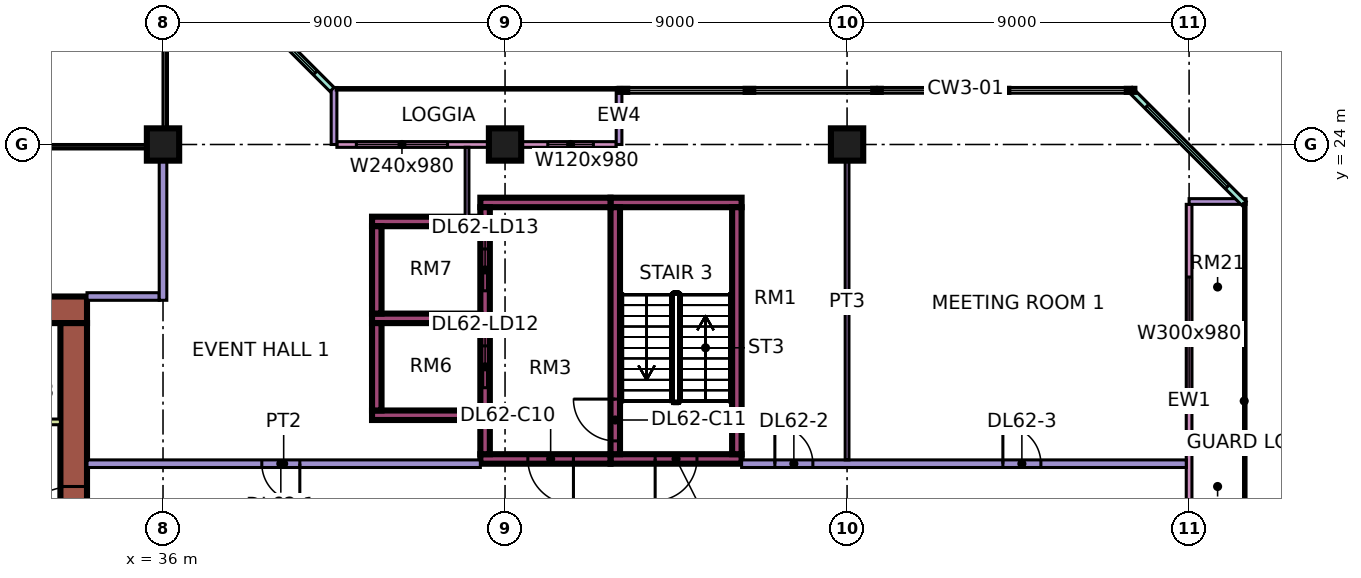
"""IFC4 building model, lengths in metres.
Left out: names, types, materials, properties, quantities, classifications, styles, units other than length and angle.
Written with IfcOpenShell. Run it as: python <this file> out.ifc"""

import sys

from ifc_helpers import new_model, si_unit, direction, frame, frame_2d, origin, origin_2d, place, context, subcontext, project, spatial, rectangle, extrude, element, fill, save


model = new_model("IFC4")
c1 = context("Model", 3, precision=1e-05, world=origin(), true_north=direction((0.0, 1.0)))
c2 = subcontext(c1, "Body", "Model", "MODEL_VIEW")
j1 = project(units=[si_unit("LENGTHUNIT", "METRE"), si_unit("PLANEANGLEUNIT", "RADIAN")], contexts=[c1])
p1 = place(None, origin())
s1 = spatial("IfcSite", under=j1, at=p1, CompositionType="ELEMENT")
p2 = place(p1, origin())
s2 = spatial("IfcBuilding", under=s1, at=p2, CompositionType="ELEMENT")
p3 = place(p2, frame((0.0, 0.0, 262.15)))
s3 = spatial("IfcBuildingStorey", under=s2, at=p3, CompositionType="ELEMENT", Elevation=262.15)
for number, where, z_axis, x_axis in (
    (1, (36.0, 24.0, 0.0), (0.0, 0.0, 1.0), (1.0, 0.0, 0.0)),
    (2, (45.0, 24.0, 0.0), (0.0, 0.0, 1.0), (1.0, 0.0, 0.0)),
    (3, (54.0, 24.0, 0.0), (0.0, 0.0, 1.0), (1.0, 0.0, 0.0)),
):
    element("IfcColumn", number, at=place(p3, frame(where, z_axis=z_axis, x_axis=x_axis)), inside=s3, PredefinedType="COLUMN", context=c2, shape_type="SweptSolid", body=[
        extrude(rectangle(XDim=0.85, YDim=0.85, at=origin_2d()), origin(), (0.0, 0.0, 1.0), 11.25),
    ])
p4 = place(p3, frame((9.0, 19.65, 0.0), z_axis=(0.0, 0.0, 1.0), x_axis=(1.0, 0.0, 0.0)))
e4 = element("IfcWall", 4, at=p4, inside=s3, PredefinedType="SHEAR", context=c2, shape_type="SweptSolid", body=[
    extrude(rectangle(XDim=25.0, YDim=0.7, at=frame_2d((12.5, 0.0))), origin(), (0.0, 0.0, 1.0), 11.25),
])
p5 = place(p4, frame((19.1, 0.0, 0.0)))
e5 = element("IfcOpeningElement", 5, at=p5, cuts=e4, PredefinedType="OPENING", context=c2, shape_type="SweptSolid", body=[
    extrude(rectangle(XDim=1.8, YDim=2.4, at=frame_2d((0.9, 1.2))), frame((0.0, 0.36, 0.0), z_axis=(0.0, -1.0, 0.0), x_axis=(1.0, 0.0, 0.0)), (0.0, 0.0, 1.0), 0.72),
])
p6 = place(p3, frame((33.65, 7.7, 0.0), z_axis=(0.0, 0.0, 1.0), x_axis=(0.0, 1.0, 0.0)))
e6 = element("IfcWall", 6, at=p6, inside=s3, PredefinedType="SHEAR", context=c2, shape_type="SweptSolid", body=[
    extrude(rectangle(XDim=11.6, YDim=0.7, at=frame_2d((5.8, 0.0))), origin(), (0.0, 0.0, 1.0), 11.25),
])
p7 = place(p6, frame((5.5, 0.0, 0.0)))
e7 = element("IfcOpeningElement", 7, at=p7, cuts=e6, PredefinedType="OPENING", context=c2, shape_type="SweptSolid", body=[
    extrude(rectangle(XDim=1.8, YDim=2.4, at=frame_2d((0.9, 1.2))), frame((0.0, 0.36, 0.0), z_axis=(0.0, -1.0, 0.0), x_axis=(1.0, 0.0, 0.0)), (0.0, 0.0, 1.0), 0.72),
])
p8 = place(p3, frame((47.775, 15.725, 0.0), z_axis=(0.0, 0.0, 1.0), x_axis=(1.0, 0.0, 0.0)))
e8 = element("IfcWall", 8, at=p8, inside=s3, PredefinedType="SHEAR", context=c2, shape_type="SweptSolid", body=[
    extrude(rectangle(XDim=3.45, YDim=0.25, at=frame_2d((1.725, 0.0))), origin(), (0.0, 0.0, 1.0), 11.25),
])
p9 = place(p8, frame((1.175, 0.0, 0.0)))
e9 = element("IfcOpeningElement", 9, at=p9, cuts=e8, PredefinedType="OPENING", context=c2, shape_type="SweptSolid", body=[
    extrude(rectangle(XDim=1.1, YDim=2.2, at=frame_2d((0.55, 1.1))), frame((0.0, 0.135, 0.0), z_axis=(0.0, -1.0, 0.0), x_axis=(1.0, 0.0, 0.0)), (0.0, 0.0, 1.0), 0.27),
])
p10 = place(p3, frame((47.775, 22.475, 0.0), z_axis=(0.0, 0.0, 1.0), x_axis=(1.0, 0.0, 0.0)))
e10 = element("IfcWall", 10, at=p10, inside=s3, PredefinedType="SHEAR", context=c2, shape_type="SweptSolid", body=[
    extrude(rectangle(XDim=3.45, YDim=0.25, at=frame_2d((1.725, 0.0))), origin(), (0.0, 0.0, 1.0), 11.25),
])
p11 = place(p3, frame((47.9, 15.85, 0.0), z_axis=(0.0, 0.0, 1.0), x_axis=(0.0, 1.0, 0.0)))
e11 = element("IfcWall", 11, at=p11, inside=s3, PredefinedType="SHEAR", context=c2, shape_type="SweptSolid", body=[
    extrude(rectangle(XDim=6.5, YDim=0.25, at=frame_2d((3.25, 0.0))), origin(), (0.0, 0.0, 1.0), 11.25),
])
p12 = place(p11, frame((0.35, 0.0, 0.0)))
e12 = element("IfcOpeningElement", 12, at=p12, cuts=e11, PredefinedType="OPENING", context=c2, shape_type="SweptSolid", body=[
    extrude(rectangle(XDim=1.1, YDim=2.2, at=frame_2d((0.55, 1.1))), frame((0.0, 0.135, 0.0), z_axis=(0.0, -1.0, 0.0), x_axis=(1.0, 0.0, 0.0)), (0.0, 0.0, 1.0), 0.27),
])
p13 = place(p3, frame((51.1, 15.85, 0.0), z_axis=(0.0, 0.0, 1.0), x_axis=(0.0, 1.0, 0.0)))
e13 = element("IfcWall", 13, at=p13, inside=s3, PredefinedType="SHEAR", context=c2, shape_type="SweptSolid", body=[
    extrude(rectangle(XDim=6.5, YDim=0.25, at=frame_2d((3.25, 0.0))), origin(), (0.0, 0.0, 1.0), 11.25),
])
p14 = place(p3, frame((44.35, 15.725, 0.0), z_axis=(0.0, 0.0, 1.0), x_axis=(1.0, 0.0, 0.0)))
e14 = element("IfcWall", 14, at=p14, inside=s3, PredefinedType="SHEAR", context=c2, shape_type="SweptSolid", body=[
    extrude(rectangle(XDim=3.425, YDim=0.25, at=frame_2d((1.712, 0.0))), origin(), (0.0, 0.0, 1.0), 11.25),
])
p15 = place(p14, frame((1.25, 0.0, 0.0)))
e15 = element("IfcOpeningElement", 15, at=p15, cuts=e14, PredefinedType="OPENING", context=c2, shape_type="SweptSolid", body=[
    extrude(rectangle(XDim=1.2, YDim=2.2, at=frame_2d((0.6, 1.1))), frame((0.0, 0.135, 0.0), z_axis=(0.0, -1.0, 0.0), x_axis=(1.0, 0.0, 0.0)), (0.0, 0.0, 1.0), 0.27),
])
p16 = place(p3, frame((44.35, 22.475, 0.0), z_axis=(0.0, 0.0, 1.0), x_axis=(1.0, 0.0, 0.0)))
e16 = element("IfcWall", 16, at=p16, inside=s3, PredefinedType="SHEAR", context=c2, shape_type="SweptSolid", body=[
    extrude(rectangle(XDim=3.425, YDim=0.25, at=frame_2d((1.712, 0.0))), origin(), (0.0, 0.0, 1.0), 11.25),
])
p17 = place(p3, frame((44.475, 15.85, 0.0), z_axis=(0.0, 0.0, 1.0), x_axis=(0.0, 1.0, 0.0)))
e17 = element("IfcWall", 17, at=p17, inside=s3, PredefinedType="SHEAR", context=c2, shape_type="SweptSolid", body=[
    extrude(rectangle(XDim=6.5, YDim=0.25, at=frame_2d((3.25, 0.0))), origin(), (0.0, 0.0, 1.0), 11.25),
])
p18 = place(p17, frame((1.75, 0.0, 0.0)))
e18 = element("IfcOpeningElement", 18, at=p18, cuts=e17, PredefinedType="OPENING", context=c2, shape_type="SweptSolid", body=[
    extrude(rectangle(XDim=1.1, YDim=2.2, at=frame_2d((0.55, 1.1))), frame((0.0, 0.135, 0.0), z_axis=(0.0, -1.0, 0.0), x_axis=(1.0, 0.0, 0.0)), (0.0, 0.0, 1.0), 0.27),
])
p19 = place(p17, frame((4.3, 0.0, 0.0)))
e19 = element("IfcOpeningElement", 19, at=p19, cuts=e17, PredefinedType="OPENING", context=c2, shape_type="SweptSolid", body=[
    extrude(rectangle(XDim=1.1, YDim=2.2, at=frame_2d((0.55, 1.1))), frame((0.0, 0.135, 0.0), z_axis=(0.0, -1.0, 0.0), x_axis=(1.0, 0.0, 0.0)), (0.0, 0.0, 1.0), 0.27),
])
for number, where, z_axis, x_axis in (
    (20, (41.5, 16.875, 0.0), (0.0, 0.0, 1.0), (1.0, 0.0, 0.0)),
    (21, (41.5, 19.425, 0.0), (0.0, 0.0, 1.0), (1.0, 0.0, 0.0)),
    (22, (41.5, 21.975, 0.0), (0.0, 0.0, 1.0), (1.0, 0.0, 0.0)),
):
    element("IfcWall", number, at=place(p3, frame(where, z_axis=z_axis, x_axis=x_axis)), inside=s3, PredefinedType="SHEAR", context=c2, shape_type="SweptSolid", body=[
        extrude(rectangle(XDim=2.85, YDim=0.25, at=frame_2d((1.425, 0.0))), origin(), (0.0, 0.0, 1.0), 11.25),
    ])
for number, where, z_axis, x_axis in (
    (23, (41.625, 17.0, 0.0), (0.0, 0.0, 1.0), (0.0, 1.0, 0.0)),
    (24, (41.625, 19.55, 0.0), (0.0, 0.0, 1.0), (0.0, 1.0, 0.0)),
):
    element("IfcWall", number, at=place(p3, frame(where, z_axis=z_axis, x_axis=x_axis)), inside=s3, PredefinedType="SHEAR", context=c2, shape_type="SweptSolid", body=[
        extrude(rectangle(XDim=2.3, YDim=0.25, at=frame_2d((1.15, 0.0))), origin(), (0.0, 0.0, 1.0), 11.25),
    ])
p20 = place(p3, frame((47.925, 24.0, 0.0), z_axis=(0.0, 0.0, 1.0), x_axis=(-1.0, 0.0, 0.0)))
e25 = element("IfcWall", 25, at=p20, inside=s3, PredefinedType="SOLIDWALL", context=c2, shape_type="SweptSolid", body=[
    extrude(rectangle(XDim=7.35, YDim=0.15, at=frame_2d((3.675, 0.0))), origin(), (0.0, 0.0, 1.0), 10.85),
])
p21 = place(p20, frame((0.6, 0.0, 0.45)))
e26 = element("IfcOpeningElement", 26, at=p21, cuts=e25, PredefinedType="OPENING", context=c2, shape_type="SweptSolid", body=[
    extrude(rectangle(XDim=1.2, YDim=9.8, at=frame_2d((0.6, 4.9))), frame((0.0, 0.085, 0.0), z_axis=(0.0, -1.0, 0.0), x_axis=(1.0, 0.0, 0.0)), (0.0, 0.0, 1.0), 0.17),
])
p22 = place(p20, frame((4.438, 0.0, 0.45)))
e27 = element("IfcOpeningElement", 27, at=p22, cuts=e25, PredefinedType="OPENING", context=c2, shape_type="SweptSolid", body=[
    extrude(rectangle(XDim=2.4, YDim=9.8, at=frame_2d((1.2, 4.9))), frame((0.0, 0.085, 0.0), z_axis=(0.0, -1.0, 0.0), x_axis=(1.0, 0.0, 0.0)), (0.0, 0.0, 1.0), 0.17),
])
for number, where, z_axis, x_axis in (
    (28, (48.0, 25.5, 0.0), (0.0, 0.0, 1.0), (0.0, -1.0, 0.0)),
    (29, (40.5, 25.5, 0.0), (0.0, 0.0, 1.0), (0.0, -1.0, 0.0)),
):
    element("IfcWall", number, at=place(p3, frame(where, z_axis=z_axis, x_axis=x_axis)), inside=s3, PredefinedType="SOLIDWALL", context=c2, shape_type="SweptSolid", body=[
        extrude(rectangle(XDim=1.5, YDim=0.15, at=frame_2d((0.75, 0.0))), origin(), (0.0, 0.0, 1.0), 10.85),
    ])
p23 = place(p3, frame((40.447, 25.447, 0.0), z_axis=(0.0, 0.0, 1.0), x_axis=(-0.707106781187, 0.707106781187, 0.0)))
e30 = element("IfcWall", 30, at=p23, inside=s3, PredefinedType="SOLIDWALL", context=c2, shape_type="SweptSolid", body=[
    extrude(rectangle(XDim=4.243, YDim=0.15, at=frame_2d((2.121, 0.0))), origin(), (0.0, 0.0, 1.0), 10.85),
])
p24 = place(p23, frame((0.621, 0.0, 0.45)))
e31 = element("IfcOpeningElement", 31, at=p24, cuts=e30, PredefinedType="OPENING", context=c2, shape_type="SweptSolid", body=[
    extrude(rectangle(XDim=3.0, YDim=9.8, at=frame_2d((1.5, 4.9))), frame((0.0, 0.085, 0.0), z_axis=(0.0, -1.0, 0.0), x_axis=(1.0, 0.0, 0.0)), (0.0, 0.0, 1.0), 0.17),
])
p25 = place(p3, frame((63.0, 12.075, 0.0), z_axis=(0.0, 0.0, 1.0), x_axis=(0.0, 1.0, 0.0)))
e32 = element("IfcWall", 32, at=p25, inside=s3, PredefinedType="SOLIDWALL", context=c2, shape_type="SweptSolid", body=[
    extrude(rectangle(XDim=10.35, YDim=0.15, at=frame_2d((5.175, 0.0))), origin(), (0.0, 0.0, 1.0), 10.85),
])
p26 = place(p25, frame((5.438, 0.0, 0.45)))
e33 = element("IfcOpeningElement", 33, at=p26, cuts=e32, PredefinedType="OPENING", context=c2, shape_type="SweptSolid", body=[
    extrude(rectangle(XDim=3.0, YDim=9.8, at=frame_2d((1.5, 4.9))), frame((0.0, 0.085, 0.0), z_axis=(0.0, -1.0, 0.0), x_axis=(1.0, 0.0, 0.0)), (0.0, 0.0, 1.0), 0.17),
])
p27 = place(p3, frame((64.5, 22.5, 0.0), z_axis=(0.0, 0.0, 1.0), x_axis=(-1.0, 0.0, 0.0)))
e34 = element("IfcWall", 34, at=p27, inside=s3, PredefinedType="SOLIDWALL", context=c2, shape_type="SweptSolid", body=[
    extrude(rectangle(XDim=1.5, YDim=0.15, at=frame_2d((0.75, 0.0))), origin(), (0.0, 0.0, 1.0), 10.85),
])
p28 = place(p3, frame((64.447, 22.447, 0.0), z_axis=(0.0, 0.0, 1.0), x_axis=(-0.707106781187, 0.707106781187, 0.0)))
e35 = element("IfcWall", 35, at=p28, inside=s3, PredefinedType="SOLIDWALL", context=c2, shape_type="SweptSolid", body=[
    extrude(rectangle(XDim=4.243, YDim=0.15, at=frame_2d((2.121, 0.0))), origin(), (0.0, 0.0, 1.0), 10.85),
])
p29 = place(p28, frame((0.621, 0.0, 0.45)))
e36 = element("IfcOpeningElement", 36, at=p29, cuts=e35, PredefinedType="OPENING", context=c2, shape_type="SweptSolid", body=[
    extrude(rectangle(XDim=3.0, YDim=9.8, at=frame_2d((1.5, 4.9))), frame((0.0, 0.085, 0.0), z_axis=(0.0, -1.0, 0.0), x_axis=(1.0, 0.0, 0.0)), (0.0, 0.0, 1.0), 0.17),
])
p30 = place(p3, frame((30.9, 16.7, 0.0), z_axis=(0.0, 0.0, 1.0), x_axis=(1.0, 0.0, 0.0)))
e37 = element("IfcWall", 37, at=p30, inside=s3, PredefinedType="PARTITIONING", context=c2, shape_type="SweptSolid", body=[
    extrude(rectangle(XDim=2.4, YDim=0.15, at=frame_2d((1.2, 0.0))), origin(), (0.0, 0.0, 1.0), 10.85),
])
p31 = place(p3, frame((34.0, 15.6, 0.0), z_axis=(0.0, 0.0, 1.0), x_axis=(1.0, 0.0, 0.0)))
e38 = element("IfcWall", 38, at=p31, inside=s3, PredefinedType="PARTITIONING", context=c2, shape_type="SweptSolid", body=[
    extrude(rectangle(XDim=10.35, YDim=0.2, at=frame_2d((5.175, 0.0))), origin(), (0.0, 0.0, 1.0), 10.85),
])
p32 = place(p31, frame((4.6, 0.0, 0.0)))
e39 = element("IfcOpeningElement", 39, at=p32, cuts=e38, PredefinedType="OPENING", context=c2, shape_type="SweptSolid", body=[
    extrude(rectangle(XDim=1.0, YDim=2.1, at=frame_2d((0.5, 1.05))), frame((0.0, 0.11, 0.0), z_axis=(0.0, -1.0, 0.0), x_axis=(1.0, 0.0, 0.0)), (0.0, 0.0, 1.0), 0.22),
])
p33 = place(p3, frame((34.0, 20.0, 0.0), z_axis=(0.0, 0.0, 1.0), x_axis=(1.0, 0.0, 0.0)))
e40 = element("IfcWall", 40, at=p33, inside=s3, PredefinedType="PARTITIONING", context=c2, shape_type="SweptSolid", body=[
    extrude(rectangle(XDim=1.9, YDim=0.2, at=frame_2d((0.95, 0.0))), origin(), (0.0, 0.0, 1.0), 10.85),
])
p34 = place(p3, frame((36.0, 19.9, 0.0), z_axis=(0.0, 0.0, 1.0), x_axis=(0.0, 1.0, 0.0)))
e41 = element("IfcWall", 41, at=p34, inside=s3, PredefinedType="PARTITIONING", context=c2, shape_type="SweptSolid", body=[
    extrude(rectangle(XDim=4.1, YDim=0.2, at=frame_2d((2.05, 0.0))), origin(), (0.0, 0.0, 1.0), 10.85),
])
p35 = place(p3, frame((44.0, 22.1, 0.0), z_axis=(0.0, 0.0, 1.0), x_axis=(0.0, 1.0, 0.0)))
e42 = element("IfcWall", 42, at=p35, inside=s3, PredefinedType="PARTITIONING", context=c2, shape_type="SweptSolid", body=[
    extrude(rectangle(XDim=1.826, YDim=0.1, at=frame_2d((0.913, 0.0))), origin(), (0.0, 0.0, 1.0), 10.85),
])
p36 = place(p3, frame((51.225, 15.6, 0.0), z_axis=(0.0, 0.0, 1.0), x_axis=(1.0, 0.0, 0.0)))
e43 = element("IfcWall", 43, at=p36, inside=s3, PredefinedType="PARTITIONING", context=c2, shape_type="SweptSolid", body=[
    extrude(rectangle(XDim=11.701, YDim=0.2, at=frame_2d((5.851, 0.0))), origin(), (0.0, 0.0, 1.0), 10.85),
])
p37 = place(p36, frame((0.875, 0.0, 0.0)))
e44 = element("IfcOpeningElement", 44, at=p37, cuts=e43, PredefinedType="OPENING", context=c2, shape_type="SweptSolid", body=[
    extrude(rectangle(XDim=1.0, YDim=2.1, at=frame_2d((0.5, 1.05))), frame((0.0, 0.11, 0.0), z_axis=(0.0, -1.0, 0.0), x_axis=(1.0, 0.0, 0.0)), (0.0, 0.0, 1.0), 0.22),
])
p38 = place(p36, frame((6.875, 0.0, 0.0)))
e45 = element("IfcOpeningElement", 45, at=p38, cuts=e43, PredefinedType="OPENING", context=c2, shape_type="SweptSolid", body=[
    extrude(rectangle(XDim=1.0, YDim=2.1, at=frame_2d((0.5, 1.05))), frame((0.0, 0.11, 0.0), z_axis=(0.0, -1.0, 0.0), x_axis=(1.0, 0.0, 0.0)), (0.0, 0.0, 1.0), 0.22),
])
p39 = place(p3, frame((54.0, 15.7, 0.0), z_axis=(0.0, 0.0, 1.0), x_axis=(0.0, 1.0, 0.0)))
e46 = element("IfcWall", 46, at=p39, inside=s3, PredefinedType="PARTITIONING", context=c2, shape_type="SweptSolid", body=[
    extrude(rectangle(XDim=8.3, YDim=0.1, at=frame_2d((4.15, 0.0))), origin(), (0.0, 0.0, 1.0), 10.85),
])
p40 = place(p21, origin())
e47 = element("IfcWindow", 47, at=p40, inside=s3, PartitioningType="SINGLE_PANEL", PredefinedType="WINDOW", context=c2, shape_type="SweptSolid", body=[
    extrude(rectangle(XDim=1.2, YDim=9.8, at=frame_2d((0.6, 4.9))), frame((0.0, 0.03, 0.0), z_axis=(0.0, -1.0, 0.0), x_axis=(1.0, 0.0, 0.0)), (0.0, 0.0, 1.0), 0.06),
])
fill(e26, e47)
p41 = place(p22, origin())
e48 = element("IfcWindow", 48, at=p41, inside=s3, PartitioningType="SINGLE_PANEL", PredefinedType="WINDOW", context=c2, shape_type="SweptSolid", body=[
    extrude(rectangle(XDim=2.4, YDim=9.8, at=frame_2d((1.2, 4.9))), frame((0.0, 0.03, 0.0), z_axis=(0.0, -1.0, 0.0), x_axis=(1.0, 0.0, 0.0)), (0.0, 0.0, 1.0), 0.06),
])
fill(e27, e48)
p42 = place(p24, origin())
e49 = element("IfcWindow", 49, at=p42, inside=s3, PartitioningType="SINGLE_PANEL", PredefinedType="WINDOW", context=c2, shape_type="SweptSolid", body=[
    extrude(rectangle(XDim=3.0, YDim=9.8, at=frame_2d((1.5, 4.9))), frame((0.0, 0.03, 0.0), z_axis=(0.0, -1.0, 0.0), x_axis=(1.0, 0.0, 0.0)), (0.0, 0.0, 1.0), 0.06),
])
fill(e31, e49)
p43 = place(p26, origin())
e50 = element("IfcWindow", 50, at=p43, inside=s3, PartitioningType="SINGLE_PANEL", PredefinedType="WINDOW", context=c2, shape_type="SweptSolid", body=[
    extrude(rectangle(XDim=3.0, YDim=9.8, at=frame_2d((1.5, 4.9))), frame((0.0, 0.03, 0.0), z_axis=(0.0, -1.0, 0.0), x_axis=(1.0, 0.0, 0.0)), (0.0, 0.0, 1.0), 0.06),
])
fill(e33, e50)
p44 = place(p29, origin())
e51 = element("IfcWindow", 51, at=p44, inside=s3, PartitioningType="SINGLE_PANEL", PredefinedType="WINDOW", context=c2, shape_type="SweptSolid", body=[
    extrude(rectangle(XDim=3.0, YDim=9.8, at=frame_2d((1.5, 4.9))), frame((0.0, 0.03, 0.0), z_axis=(0.0, -1.0, 0.0), x_axis=(1.0, 0.0, 0.0)), (0.0, 0.0, 1.0), 0.06),
])
fill(e36, e51)
p45 = place(p7, origin())
e52 = element("IfcDoor", 52, at=p45, inside=s3, OperationType="DOUBLE_DOOR_SINGLE_SWING", PredefinedType="DOOR", context=c2, shape_type="SweptSolid", body=[
    extrude(rectangle(XDim=1.8, YDim=2.4, at=frame_2d((0.9, 1.2))), frame((0.0, 0.025, 0.0), z_axis=(0.0, -1.0, 0.0), x_axis=(1.0, 0.0, 0.0)), (0.0, 0.0, 1.0), 0.05),
])
fill(e7, e52)
p46 = place(p9, frame((1.1, 0.0, 0.0), z_axis=(0.0, 0.0, 1.0), x_axis=(-1.0, 0.0, 0.0)))
e53 = element("IfcDoor", 53, at=p46, inside=s3, OperationType="SINGLE_SWING_LEFT", PredefinedType="DOOR", context=c2, shape_type="SweptSolid", body=[
    extrude(rectangle(XDim=1.1, YDim=2.2, at=frame_2d((0.55, 1.1))), frame((0.0, 0.025, 0.0), z_axis=(0.0, -1.0, 0.0), x_axis=(1.0, 0.0, 0.0)), (0.0, 0.0, 1.0), 0.05),
])
fill(e9, e53)
p47 = place(p15, origin())
e54 = element("IfcDoor", 54, at=p47, inside=s3, OperationType="SINGLE_SWING_RIGHT", PredefinedType="DOOR", context=c2, shape_type="SweptSolid", body=[
    extrude(rectangle(XDim=1.2, YDim=2.2, at=frame_2d((0.6, 1.1))), frame((0.0, 0.025, 0.0), z_axis=(0.0, -1.0, 0.0), x_axis=(1.0, 0.0, 0.0)), (0.0, 0.0, 1.0), 0.05),
])
fill(e15, e54)
p48 = place(p12, frame((1.1, 0.0, 0.0), z_axis=(0.0, 0.0, 1.0), x_axis=(-1.0, 0.0, 0.0)))
e55 = element("IfcDoor", 55, at=p48, inside=s3, OperationType="SINGLE_SWING_RIGHT", PredefinedType="DOOR", context=c2, shape_type="SweptSolid", body=[
    extrude(rectangle(XDim=1.1, YDim=2.2, at=frame_2d((0.55, 1.1))), frame((0.0, 0.025, 0.0), z_axis=(0.0, -1.0, 0.0), x_axis=(1.0, 0.0, 0.0)), (0.0, 0.0, 1.0), 0.05),
])
fill(e12, e55)
p49 = place(p18, origin())
e56 = element("IfcDoor", 56, at=p49, inside=s3, OperationType="DOUBLE_DOOR_SLIDING", PredefinedType="DOOR", context=c2, shape_type="SweptSolid", body=[
    extrude(rectangle(XDim=1.1, YDim=2.2, at=frame_2d((0.55, 1.1))), frame((0.0, 0.025, 0.0), z_axis=(0.0, -1.0, 0.0), x_axis=(1.0, 0.0, 0.0)), (0.0, 0.0, 1.0), 0.05),
])
fill(e18, e56)
p50 = place(p19, origin())
e57 = element("IfcDoor", 57, at=p50, inside=s3, OperationType="DOUBLE_DOOR_SLIDING", PredefinedType="DOOR", context=c2, shape_type="SweptSolid", body=[
    extrude(rectangle(XDim=1.1, YDim=2.2, at=frame_2d((0.55, 1.1))), frame((0.0, 0.025, 0.0), z_axis=(0.0, -1.0, 0.0), x_axis=(1.0, 0.0, 0.0)), (0.0, 0.0, 1.0), 0.05),
])
fill(e19, e57)
p51 = place(p32, origin())
e58 = element("IfcDoor", 58, at=p51, inside=s3, OperationType="SINGLE_SWING_RIGHT", PredefinedType="DOOR", context=c2, shape_type="SweptSolid", body=[
    extrude(rectangle(XDim=1.0, YDim=2.1, at=frame_2d((0.5, 1.05))), frame((0.0, 0.025, 0.0), z_axis=(0.0, -1.0, 0.0), x_axis=(1.0, 0.0, 0.0)), (0.0, 0.0, 1.0), 0.05),
])
fill(e39, e58)
p52 = place(p37, origin())
e59 = element("IfcDoor", 59, at=p52, inside=s3, OperationType="SINGLE_SWING_LEFT", PredefinedType="DOOR", context=c2, shape_type="SweptSolid", body=[
    extrude(rectangle(XDim=1.0, YDim=2.1, at=frame_2d((0.5, 1.05))), frame((0.0, 0.025, 0.0), z_axis=(0.0, -1.0, 0.0), x_axis=(1.0, 0.0, 0.0)), (0.0, 0.0, 1.0), 0.05),
])
fill(e44, e59)
p53 = place(p38, origin())
e60 = element("IfcDoor", 60, at=p53, inside=s3, OperationType="SINGLE_SWING_LEFT", PredefinedType="DOOR", context=c2, shape_type="SweptSolid", body=[
    extrude(rectangle(XDim=1.0, YDim=2.1, at=frame_2d((0.5, 1.05))), frame((0.0, 0.025, 0.0), z_axis=(0.0, -1.0, 0.0), x_axis=(1.0, 0.0, 0.0)), (0.0, 0.0, 1.0), 0.05),
])
fill(e45, e60)
save(model, sys.argv[1])
